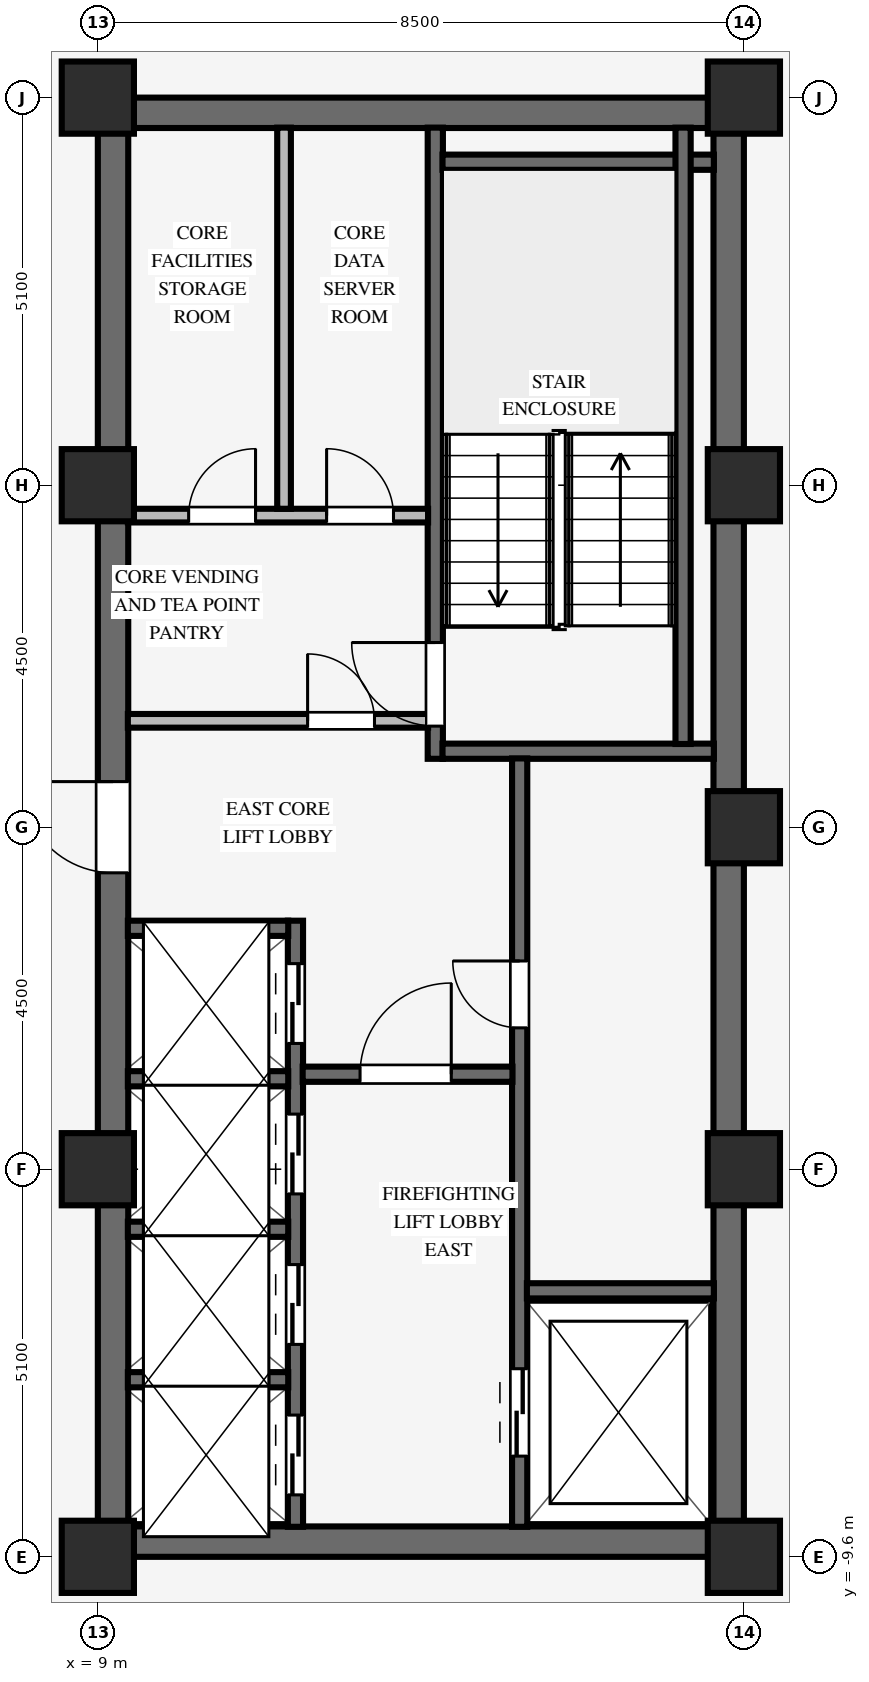
"""IFC4 building model, lengths in metres.
Left out: names, types, materials, properties, quantities, classifications, styles, units other than length and angle.
Written with IfcOpenShell. Run it as: python <this file> out.ifc"""

import sys

from ifc_helpers import new_model, si_unit, direction, frame, frame_2d, origin, origin_2d, place, context, subcontext, project, spatial, rectangle, extrude, source, transform, mapped, element, fill, save


model = new_model("IFC4")
c1 = context("Model", 3, precision=1e-05, world=origin(), true_north=direction((0.0, 1.0)))
c2 = subcontext(c1, "Body", "Model", "MODEL_VIEW")
j1 = project(units=[si_unit("LENGTHUNIT", "METRE"), si_unit("PLANEANGLEUNIT", "RADIAN")], contexts=[c1])
p1 = place(None, origin())
s1 = spatial("IfcSite", under=j1, at=p1, CompositionType="ELEMENT")
p2 = place(p1, origin())
s2 = spatial("IfcBuilding", under=s1, at=p2, CompositionType="ELEMENT")
p3 = place(p2, frame((0.0, 0.0, 149.4)))
s3 = spatial("IfcBuildingStorey", under=s2, at=p3, CompositionType="ELEMENT", Elevation=149.4)
for number, where, z_axis, x_axis in (
    (1, (9.0, -9.4, 0.0), (0.0, 0.0, 1.0), (1.0, 0.0, 0.0)),
    (2, (9.0, 9.4, 0.0), (0.0, 0.0, 1.0), (1.0, 0.0, 0.0)),
):
    element("IfcWall", number, at=place(p3, frame(where, z_axis=z_axis, x_axis=x_axis)), inside=s3, PredefinedType="SHEAR", context=c2, shape_type="SweptSolid", body=[
        extrude(rectangle(XDim=8.5, YDim=0.4, at=frame_2d((4.25, 0.0))), origin(), (0.0, 0.0, 1.0), 3.37),
    ])
p4 = place(p3, frame((9.2, -9.205, 0.0), z_axis=(0.0, 0.0, 1.0), x_axis=(0.0, 1.0, 0.0)))
e3 = element("IfcWall", 3, at=p4, inside=s3, PredefinedType="SHEAR", context=c2, shape_type="SweptSolid", body=[
    extrude(rectangle(XDim=18.41, YDim=0.4, at=frame_2d((9.205, 0.0))), origin(), (0.0, 0.0, 1.0), 3.37),
])
p5 = place(p4, frame((8.605, 0.0, 0.0)))
e4 = element("IfcOpeningElement", 4, at=p5, cuts=e3, PredefinedType="OPENING", context=c2, shape_type="SweptSolid", body=[
    extrude(rectangle(XDim=1.2, YDim=2.15, at=frame_2d((0.6, 1.075))), frame((0.0, 0.21, 0.0), z_axis=(0.0, -1.0, 0.0), x_axis=(1.0, 0.0, 0.0)), (0.0, 0.0, 1.0), 0.42),
])
p6 = place(p3, frame((17.3, -9.205, 0.0), z_axis=(0.0, 0.0, 1.0), x_axis=(0.0, 1.0, 0.0)))
e5 = element("IfcWall", 5, at=p6, inside=s3, PredefinedType="SHEAR", context=c2, shape_type="SweptSolid", body=[
    extrude(rectangle(XDim=18.41, YDim=0.4, at=frame_2d((9.205, 0.0))), origin(), (0.0, 0.0, 1.0), 3.37),
])
for number, where, z_axis, x_axis in (
    (6, (9.0, -9.6, 0.0), (0.0, 0.0, 1.0), (1.0, 0.0, 0.0)),
    (7, (9.0, -4.5, 0.0), (0.0, 0.0, 1.0), (1.0, 0.0, 0.0)),
    (8, (9.0, 4.5, 0.0), (0.0, 0.0, 1.0), (1.0, 0.0, 0.0)),
    (9, (9.0, 9.6, 0.0), (0.0, 0.0, 1.0), (1.0, 0.0, 0.0)),
    (10, (17.5, -9.6, 0.0), (0.0, 0.0, 1.0), (1.0, 0.0, 0.0)),
    (11, (17.5, -4.5, 0.0), (0.0, 0.0, 1.0), (1.0, 0.0, 0.0)),
    (12, (17.5, 4.5, 0.0), (0.0, 0.0, 1.0), (1.0, 0.0, 0.0)),
    (13, (17.5, 9.6, 0.0), (0.0, 0.0, 1.0), (1.0, 0.0, 0.0)),
    (14, (17.5, 0.0, 0.0), (0.0, 0.0, 1.0), (1.0, 0.0, 0.0)),
):
    element("IfcColumn", number, at=place(p3, frame(where, z_axis=z_axis, x_axis=x_axis)), inside=s3, PredefinedType="COLUMN", context=c2, shape_type="SweptSolid", body=[
        extrude(rectangle(XDim=0.95, YDim=0.95, at=origin_2d()), origin(), (0.0, 0.0, 1.0), 3.37),
    ])
p7 = place(p3, frame((13.44, 0.9, 0.0), z_axis=(0.0, 0.0, 1.0), x_axis=(0.0, 1.0, 0.0)))
e15 = element("IfcWall", 15, at=p7, inside=s3, PredefinedType="SHEAR", context=c2, shape_type="SweptSolid", body=[
    extrude(rectangle(XDim=8.305, YDim=0.2, at=frame_2d((4.153, 0.0))), origin(), (0.0, 0.0, 1.0), 3.37),
])
p8 = place(p7, frame((0.43, 0.0, 0.0)))
e16 = element("IfcOpeningElement", 16, at=p8, cuts=e15, PredefinedType="OPENING", context=c2, shape_type="SweptSolid", body=[
    extrude(rectangle(XDim=1.1, YDim=2.15, at=frame_2d((0.55, 1.075))), frame((0.0, 0.11, 0.0), z_axis=(0.0, -1.0, 0.0), x_axis=(1.0, 0.0, 0.0)), (0.0, 0.0, 1.0), 0.22),
])
for number, where, z_axis, x_axis in (
    (17, (13.535, 1.0, 0.0), (0.0, 0.0, 1.0), (1.0, 0.0, 0.0)),
    (18, (13.535, 8.75, 0.0), (0.0, 0.0, 1.0), (1.0, 0.0, 0.0)),
):
    element("IfcWall", number, at=place(p3, frame(where, z_axis=z_axis, x_axis=x_axis)), inside=s3, PredefinedType="SHEAR", context=c2, shape_type="SweptSolid", body=[
        extrude(rectangle(XDim=3.57, YDim=0.2, at=frame_2d((1.785, 0.0))), origin(), (0.0, 0.0, 1.0), 3.37),
    ])
p9 = place(p3, frame((16.7, 1.095, 0.0), z_axis=(0.0, 0.0, 1.0), x_axis=(0.0, 1.0, 0.0)))
e19 = element("IfcWall", 19, at=p9, inside=s3, PredefinedType="SHEAR", context=c2, shape_type="SweptSolid", body=[
    extrude(rectangle(XDim=8.11, YDim=0.2, at=frame_2d((4.055, 0.0))), origin(), (0.0, 0.0, 1.0), 3.37),
])
p10 = place(p3, frame((14.55, -9.205, 0.0), z_axis=(0.0, 0.0, 1.0), x_axis=(0.0, 1.0, 0.0)))
e20 = element("IfcWall", 20, at=p10, inside=s3, PredefinedType="SHEAR", context=c2, shape_type="SweptSolid", body=[
    extrude(rectangle(XDim=10.11, YDim=0.2, at=frame_2d((5.055, 0.0))), origin(), (0.0, 0.0, 1.0), 3.37),
])
p11 = place(p10, frame((6.565, 0.0, 0.0)))
e21 = element("IfcOpeningElement", 21, at=p11, cuts=e20, PredefinedType="OPENING", context=c2, shape_type="SweptSolid", body=[
    extrude(rectangle(XDim=0.88, YDim=2.1, at=frame_2d((0.44, 1.05))), frame((0.0, 0.11, 0.0), z_axis=(0.0, -1.0, 0.0), x_axis=(1.0, 0.0, 0.0)), (0.0, 0.0, 1.0), 0.22),
])
p12 = place(p10, frame((0.93, 0.0, 0.0)))
e22 = element("IfcOpeningElement", 22, at=p12, cuts=e20, PredefinedType="OPENING", context=c2, shape_type="SweptSolid", body=[
    extrude(rectangle(XDim=1.15, YDim=2.15, at=frame_2d((0.575, 1.075))), frame((0.0, 0.11, 0.0), z_axis=(0.0, -1.0, 0.0), x_axis=(1.0, 0.0, 0.0)), (0.0, 0.0, 1.0), 0.22),
])
p13 = place(p3, frame((14.645, -6.1, 0.0), z_axis=(0.0, 0.0, 1.0), x_axis=(1.0, 0.0, 0.0)))
e23 = element("IfcWall", 23, at=p13, inside=s3, PredefinedType="SHEAR", context=c2, shape_type="SweptSolid", body=[
    extrude(rectangle(XDim=2.46, YDim=0.2, at=frame_2d((1.23, 0.0))), origin(), (0.0, 0.0, 1.0), 3.37),
])
p14 = place(p3, frame((11.6, -9.205, 0.0), z_axis=(0.0, 0.0, 1.0), x_axis=(0.0, 1.0, 0.0)))
e24 = element("IfcWall", 24, at=p14, inside=s3, PredefinedType="SHEAR", context=c2, shape_type="SweptSolid", body=[
    extrude(rectangle(XDim=7.975, YDim=0.2, at=frame_2d((3.988, 0.0))), origin(), (0.0, 0.0, 1.0), 3.37),
])
p15 = place(p14, frame((0.42, 0.0, 0.0)))
e25 = element("IfcOpeningElement", 25, at=p15, cuts=e24, PredefinedType="OPENING", context=c2, shape_type="SweptSolid", body=[
    extrude(rectangle(XDim=1.05, YDim=2.15, at=frame_2d((0.525, 1.075))), frame((0.0, 0.11, 0.0), z_axis=(0.0, -1.0, 0.0), x_axis=(1.0, 0.0, 0.0)), (0.0, 0.0, 1.0), 0.22),
])
p16 = place(p14, frame((2.4, 0.0, 0.0)))
e26 = element("IfcOpeningElement", 26, at=p16, cuts=e24, PredefinedType="OPENING", context=c2, shape_type="SweptSolid", body=[
    extrude(rectangle(XDim=1.05, YDim=2.15, at=frame_2d((0.525, 1.075))), frame((0.0, 0.11, 0.0), z_axis=(0.0, -1.0, 0.0), x_axis=(1.0, 0.0, 0.0)), (0.0, 0.0, 1.0), 0.22),
])
p17 = place(p14, frame((4.38, 0.0, 0.0)))
e27 = element("IfcOpeningElement", 27, at=p17, cuts=e24, PredefinedType="OPENING", context=c2, shape_type="SweptSolid", body=[
    extrude(rectangle(XDim=1.05, YDim=2.15, at=frame_2d((0.525, 1.075))), frame((0.0, 0.11, 0.0), z_axis=(0.0, -1.0, 0.0), x_axis=(1.0, 0.0, 0.0)), (0.0, 0.0, 1.0), 0.22),
])
p18 = place(p14, frame((6.36, 0.0, 0.0)))
e28 = element("IfcOpeningElement", 28, at=p18, cuts=e24, PredefinedType="OPENING", context=c2, shape_type="SweptSolid", body=[
    extrude(rectangle(XDim=1.05, YDim=2.15, at=frame_2d((0.525, 1.075))), frame((0.0, 0.11, 0.0), z_axis=(0.0, -1.0, 0.0), x_axis=(1.0, 0.0, 0.0)), (0.0, 0.0, 1.0), 0.22),
])
p19 = place(p3, frame((11.695, -3.25, 0.0), z_axis=(0.0, 0.0, 1.0), x_axis=(1.0, 0.0, 0.0)))
e29 = element("IfcWall", 29, at=p19, inside=s3, PredefinedType="SHEAR", context=c2, shape_type="SweptSolid", body=[
    extrude(rectangle(XDim=2.76, YDim=0.2, at=frame_2d((1.38, 0.0))), origin(), (0.0, 0.0, 1.0), 3.37),
])
p20 = place(p19, frame((0.755, 0.0, 0.0)))
e30 = element("IfcOpeningElement", 30, at=p20, cuts=e29, PredefinedType="OPENING", context=c2, shape_type="SweptSolid", body=[
    extrude(rectangle(XDim=1.2, YDim=2.15, at=frame_2d((0.6, 1.075))), frame((0.0, 0.11, 0.0), z_axis=(0.0, -1.0, 0.0), x_axis=(1.0, 0.0, 0.0)), (0.0, 0.0, 1.0), 0.22),
])
for number, where, z_axis, x_axis in (
    (31, (9.395, -7.27, 0.0), (0.0, 0.0, 1.0), (1.0, 0.0, 0.0)),
    (32, (9.395, -5.29, 0.0), (0.0, 0.0, 1.0), (1.0, 0.0, 0.0)),
    (33, (9.395, -3.31, 0.0), (0.0, 0.0, 1.0), (1.0, 0.0, 0.0)),
    (34, (9.395, -1.33, 0.0), (0.0, 0.0, 1.0), (1.0, 0.0, 0.0)),
):
    element("IfcWall", number, at=place(p3, frame(where, z_axis=z_axis, x_axis=x_axis)), inside=s3, PredefinedType="SHEAR", context=c2, shape_type="SweptSolid", body=[
        extrude(rectangle(XDim=2.11, YDim=0.2, at=frame_2d((1.055, 0.0))), origin(), (0.0, 0.0, 1.0), 3.37),
    ])
p21 = place(p3, frame((9.395, 1.4, 0.0), z_axis=(0.0, 0.0, 1.0), x_axis=(1.0, 0.0, 0.0)))
e35 = element("IfcWall", 35, at=p21, inside=s3, PredefinedType="PARTITIONING", context=c2, shape_type="SweptSolid", body=[
    extrude(rectangle(XDim=3.95, YDim=0.18, at=frame_2d((1.975, 0.0))), origin(), (0.0, 0.0, 1.0), 3.36),
])
p22 = place(p21, frame((2.365, 0.0, 0.0)))
e36 = element("IfcOpeningElement", 36, at=p22, cuts=e35, PredefinedType="OPENING", context=c2, shape_type="SweptSolid", body=[
    extrude(rectangle(XDim=0.88, YDim=2.1, at=frame_2d((0.44, 1.05))), frame((0.0, 0.1, 0.0), z_axis=(0.0, -1.0, 0.0), x_axis=(1.0, 0.0, 0.0)), (0.0, 0.0, 1.0), 0.2),
])
p23 = place(p3, frame((9.395, 4.1, 0.0), z_axis=(0.0, 0.0, 1.0), x_axis=(1.0, 0.0, 0.0)))
e37 = element("IfcWall", 37, at=p23, inside=s3, PredefinedType="PARTITIONING", context=c2, shape_type="SweptSolid", body=[
    extrude(rectangle(XDim=3.95, YDim=0.18, at=frame_2d((1.975, 0.0))), origin(), (0.0, 0.0, 1.0), 3.36),
])
p24 = place(p23, frame((0.8, 0.0, 0.0)))
e38 = element("IfcOpeningElement", 38, at=p24, cuts=e37, PredefinedType="OPENING", context=c2, shape_type="SweptSolid", body=[
    extrude(rectangle(XDim=0.88, YDim=2.1, at=frame_2d((0.44, 1.05))), frame((0.0, 0.1, 0.0), z_axis=(0.0, -1.0, 0.0), x_axis=(1.0, 0.0, 0.0)), (0.0, 0.0, 1.0), 0.2),
])
p25 = place(p23, frame((2.615, 0.0, 0.0)))
e39 = element("IfcOpeningElement", 39, at=p25, cuts=e37, PredefinedType="OPENING", context=c2, shape_type="SweptSolid", body=[
    extrude(rectangle(XDim=0.88, YDim=2.1, at=frame_2d((0.44, 1.05))), frame((0.0, 0.1, 0.0), z_axis=(0.0, -1.0, 0.0), x_axis=(1.0, 0.0, 0.0)), (0.0, 0.0, 1.0), 0.2),
])
p26 = place(p3, frame((11.45, 4.19, 0.0), z_axis=(0.0, 0.0, 1.0), x_axis=(0.0, 1.0, 0.0)))
e40 = element("IfcWall", 40, at=p26, inside=s3, PredefinedType="PARTITIONING", context=c2, shape_type="SweptSolid", body=[
    extrude(rectangle(XDim=5.015, YDim=0.18, at=frame_2d((2.508, 0.0))), origin(), (0.0, 0.0, 1.0), 3.36),
])
m1 = source(origin(), c2, "Body", "SweptSolid", [
    extrude(rectangle(XDim=1.1, YDim=2.15, at=frame_2d((0.55, 1.075))), frame((0.0, 0.025, 0.0), z_axis=(0.0, -1.0, 0.0), x_axis=(1.0, 0.0, 0.0)), (0.0, 0.0, 1.0), 0.05),
])
p27 = place(p8, origin())
e41 = element("IfcDoor", 41, at=p27, inside=s3, OperationType="SINGLE_SWING_RIGHT", PredefinedType="DOOR", context=c2, shape_type="MappedRepresentation", body=[
    mapped(m1, transform((0.0, 0.0, 0.0), scale=1.0)),
])
fill(e16, e41)
m2 = source(origin(), c2, "Body", "SweptSolid", [
    extrude(rectangle(XDim=0.88, YDim=2.1, at=frame_2d((0.44, 1.05))), frame((0.0, 0.025, 0.0), z_axis=(0.0, -1.0, 0.0), x_axis=(1.0, 0.0, 0.0)), (0.0, 0.0, 1.0), 0.05),
])
p28 = place(p11, origin())
e42 = element("IfcDoor", 42, at=p28, inside=s3, OperationType="SINGLE_SWING_RIGHT", PredefinedType="DOOR", context=c2, shape_type="MappedRepresentation", body=[
    mapped(m2, transform((0.0, 0.0, 0.0), scale=1.0)),
])
fill(e21, e42)
m3 = source(origin(), c2, "Body", "SweptSolid", [
    extrude(rectangle(XDim=1.2, YDim=2.15, at=frame_2d((0.6, 1.075))), frame((0.0, 0.025, 0.0), z_axis=(0.0, -1.0, 0.0), x_axis=(1.0, 0.0, 0.0)), (0.0, 0.0, 1.0), 0.05),
])
p29 = place(p20, origin())
e43 = element("IfcDoor", 43, at=p29, inside=s3, OperationType="SINGLE_SWING_RIGHT", PredefinedType="DOOR", context=c2, shape_type="MappedRepresentation", body=[
    mapped(m3, transform((0.0, 0.0, 0.0), scale=1.0)),
])
fill(e30, e43)
p30 = place(p5, origin())
e44 = element("IfcDoor", 44, at=p30, inside=s3, OperationType="SINGLE_SWING_RIGHT", PredefinedType="DOOR", context=c2, shape_type="MappedRepresentation", body=[
    mapped(m3, transform((0.0, 0.0, 0.0), scale=1.0)),
])
fill(e4, e44)
p31 = place(p22, origin())
e45 = element("IfcDoor", 45, at=p31, inside=s3, OperationType="SINGLE_SWING_LEFT", PredefinedType="DOOR", context=c2, shape_type="MappedRepresentation", body=[
    mapped(m2, transform((0.0, 0.0, 0.0), scale=1.0)),
])
fill(e36, e45)
p32 = place(p24, origin())
e46 = element("IfcDoor", 46, at=p32, inside=s3, OperationType="SINGLE_SWING_RIGHT", PredefinedType="DOOR", context=c2, shape_type="MappedRepresentation", body=[
    mapped(m2, transform((0.0, 0.0, 0.0), scale=1.0)),
])
fill(e38, e46)
p33 = place(p25, origin())
e47 = element("IfcDoor", 47, at=p33, inside=s3, OperationType="SINGLE_SWING_LEFT", PredefinedType="DOOR", context=c2, shape_type="MappedRepresentation", body=[
    mapped(m2, transform((0.0, 0.0, 0.0), scale=1.0)),
])
fill(e39, e47)
m4 = source(origin(), c2, "Body", "SweptSolid", [
    extrude(rectangle(XDim=1.15, YDim=2.15, at=frame_2d((0.575, 1.075))), frame((0.0, 0.025, 0.0), z_axis=(0.0, -1.0, 0.0), x_axis=(1.0, 0.0, 0.0)), (0.0, 0.0, 1.0), 0.05),
])
p34 = place(p12, origin())
e48 = element("IfcDoor", 48, at=p34, inside=s3, OperationType="DOUBLE_DOOR_SLIDING", PredefinedType="DOOR", context=c2, shape_type="MappedRepresentation", body=[
    mapped(m4, transform((0.0, 0.0, 0.0), scale=1.0)),
])
fill(e22, e48)
m5 = source(origin(), c2, "Body", "SweptSolid", [
    extrude(rectangle(XDim=1.05, YDim=2.15, at=frame_2d((0.525, 1.075))), frame((0.0, 0.025, 0.0), z_axis=(0.0, -1.0, 0.0), x_axis=(1.0, 0.0, 0.0)), (0.0, 0.0, 1.0), 0.05),
])
p35 = place(p15, origin())
e49 = element("IfcDoor", 49, at=p35, inside=s3, OperationType="DOUBLE_DOOR_SLIDING", PredefinedType="DOOR", context=c2, shape_type="MappedRepresentation", body=[
    mapped(m5, transform((0.0, 0.0, 0.0), scale=1.0)),
])
fill(e25, e49)
p36 = place(p16, origin())
e50 = element("IfcDoor", 50, at=p36, inside=s3, OperationType="DOUBLE_DOOR_SLIDING", PredefinedType="DOOR", context=c2, shape_type="MappedRepresentation", body=[
    mapped(m5, transform((0.0, 0.0, 0.0), scale=1.0)),
])
fill(e26, e50)
p37 = place(p17, origin())
e51 = element("IfcDoor", 51, at=p37, inside=s3, OperationType="DOUBLE_DOOR_SLIDING", PredefinedType="DOOR", context=c2, shape_type="MappedRepresentation", body=[
    mapped(m5, transform((0.0, 0.0, 0.0), scale=1.0)),
])
fill(e27, e51)
p38 = place(p18, origin())
e52 = element("IfcDoor", 52, at=p38, inside=s3, OperationType="DOUBLE_DOOR_SLIDING", PredefinedType="DOOR", context=c2, shape_type="MappedRepresentation", body=[
    mapped(m5, transform((0.0, 0.0, 0.0), scale=1.0)),
])
fill(e28, e52)
save(model, sys.argv[1])
